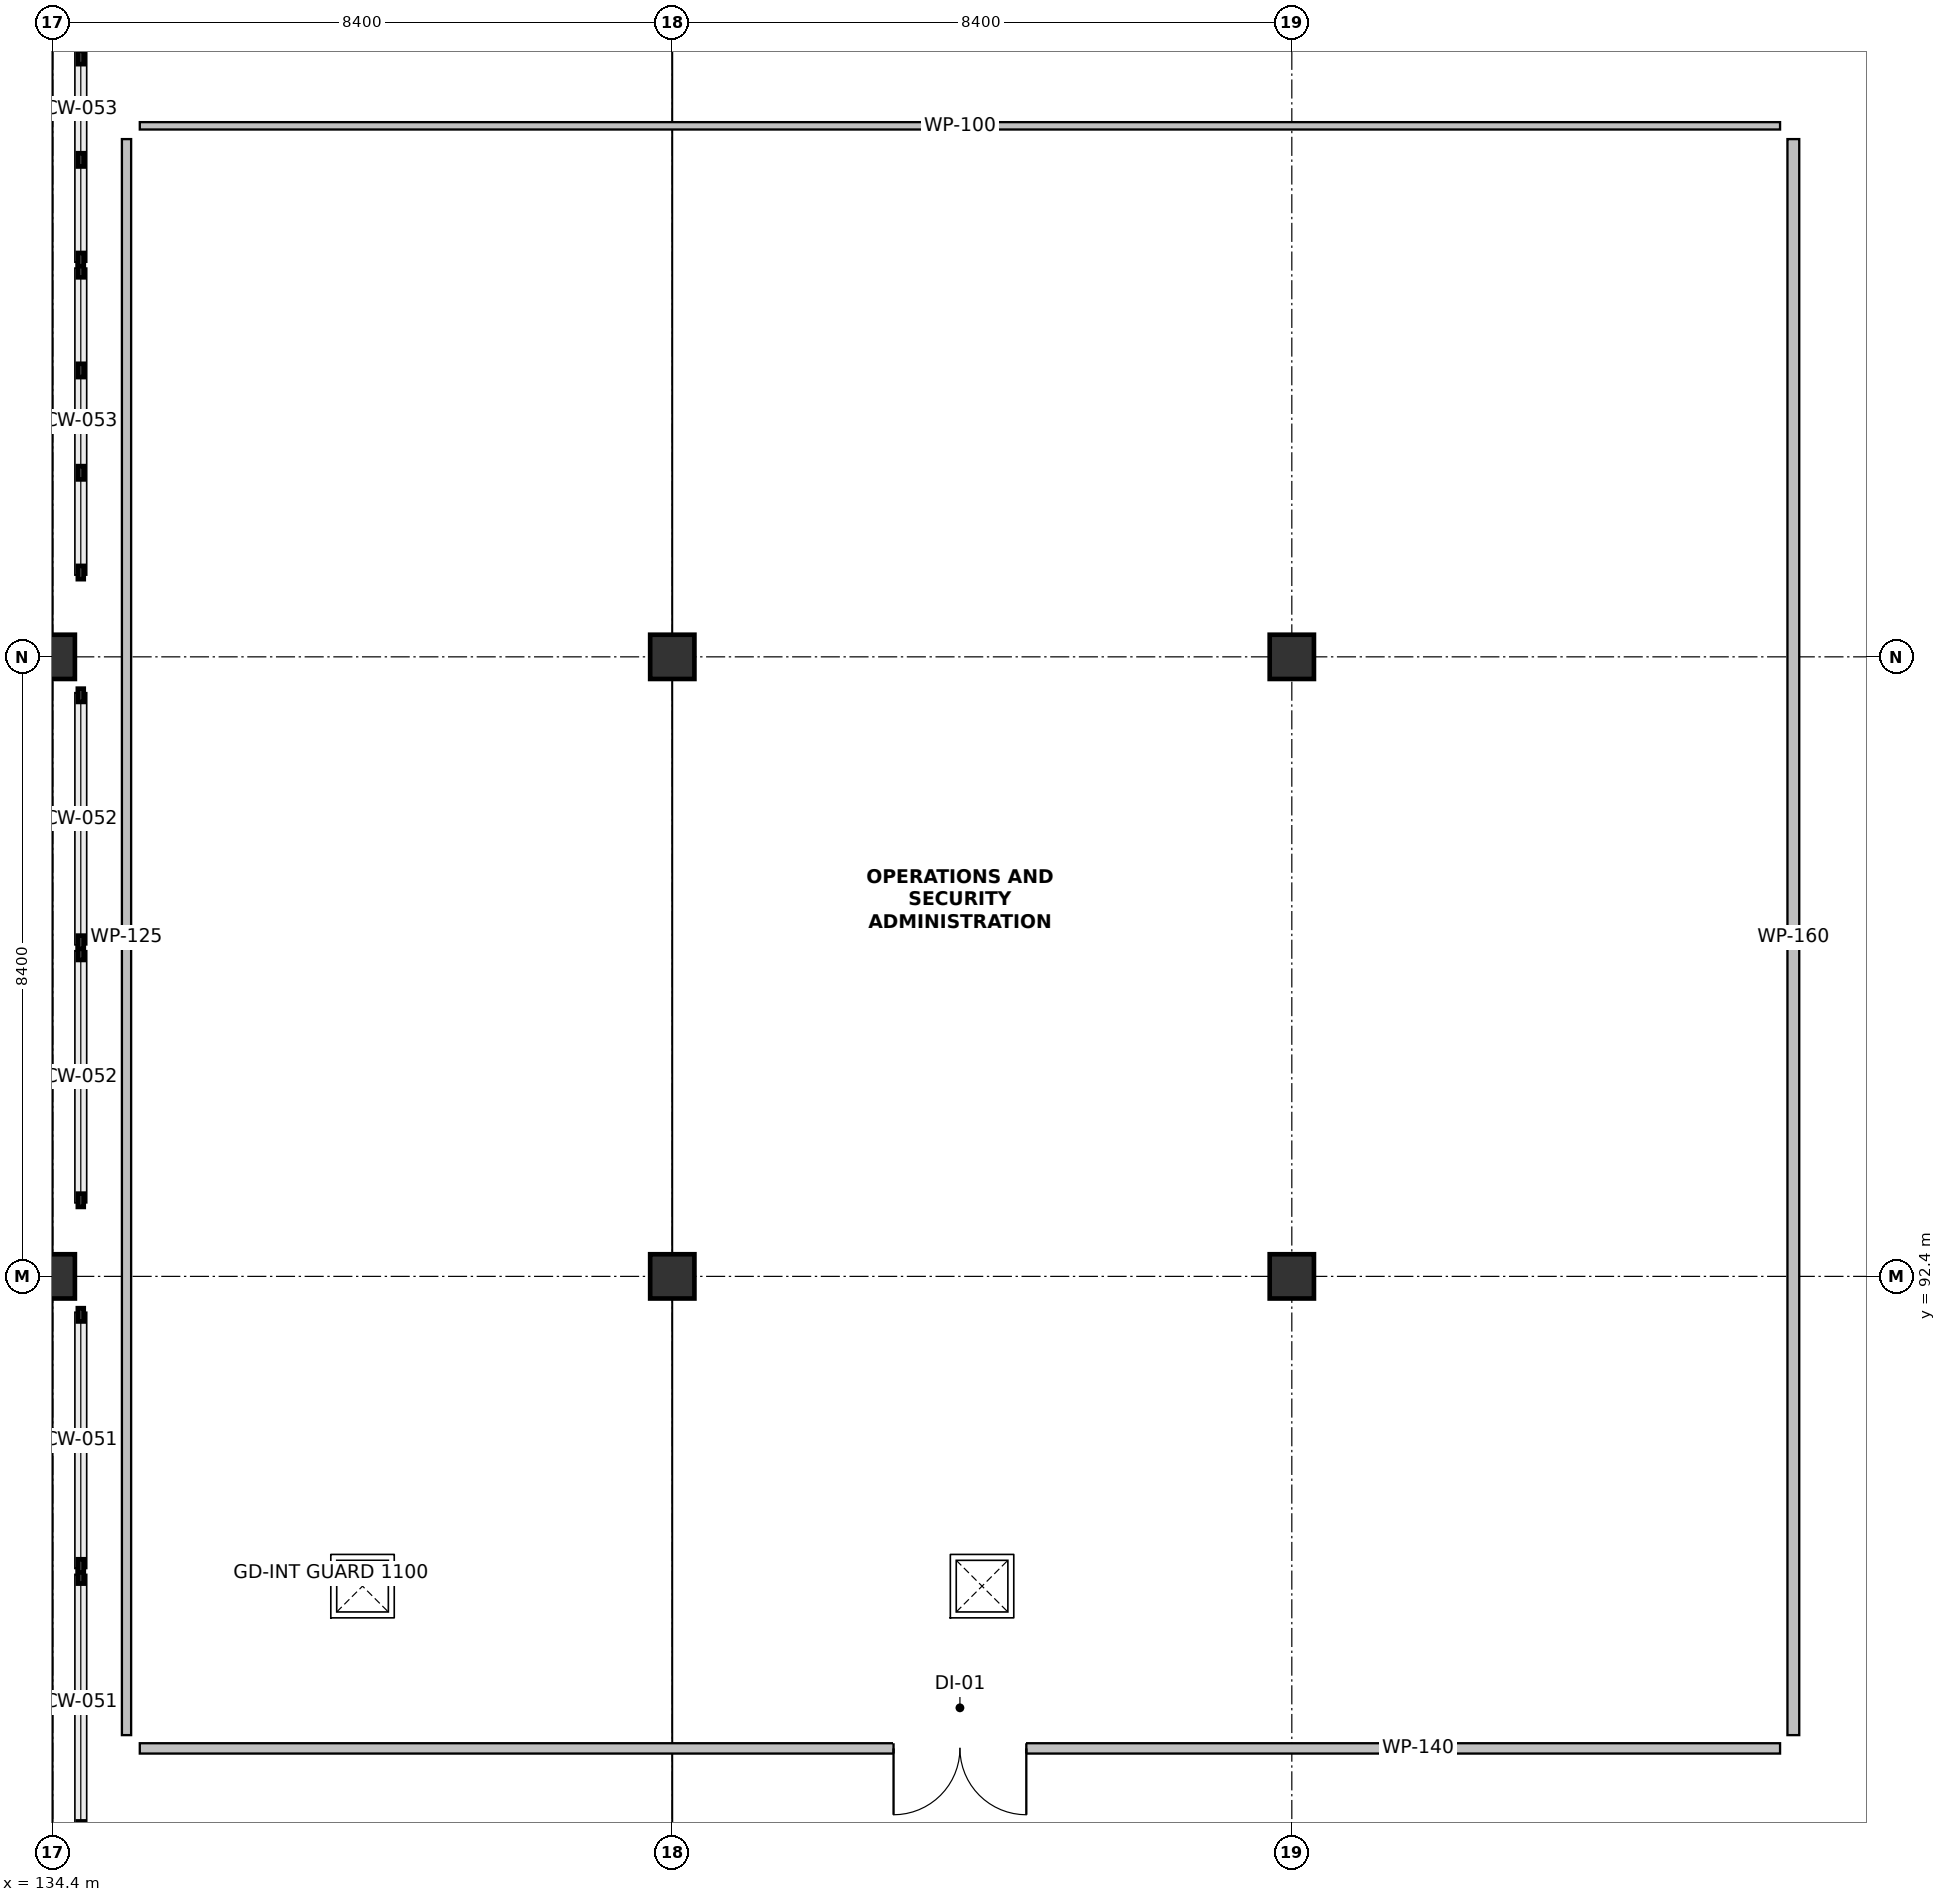
"""IFC4 building model, lengths in metres.
Left out: names, types, materials, properties, quantities, classifications, styles, units other than length and angle.
Written with IfcOpenShell. Run it as: python <this file> out.ifc"""

import sys

from ifc_helpers import new_model, si_unit, direction, frame, frame_2d, origin, origin_2d, place, context, subcontext, project, spatial, rectangle, extrude, element, fill, save


model = new_model("IFC4")
c1 = context("Model", 3, precision=1e-05, world=origin(), true_north=direction((0.0, 1.0)))
c2 = subcontext(c1, "Body", "Model", "MODEL_VIEW")
j1 = project(units=[si_unit("LENGTHUNIT", "METRE"), si_unit("PLANEANGLEUNIT", "RADIAN")], contexts=[c1])
p1 = place(None, origin())
s1 = spatial("IfcSite", under=j1, at=p1, CompositionType="ELEMENT")
p2 = place(p1, origin())
s2 = spatial("IfcBuilding", under=s1, at=p2, CompositionType="ELEMENT")
p3 = place(p2, origin())
s3 = spatial("IfcBuildingStorey", under=s2, at=p3, CompositionType="ELEMENT", Elevation=0.0)
for number, where, z_axis, x_axis in (
    (1, (134.4, 92.4, 0.0), (0.0, 0.0, 1.0), (1.0, 0.0, 0.0)),
    (2, (134.4, 100.8, 0.0), (0.0, 0.0, 1.0), (1.0, 0.0, 0.0)),
    (3, (142.8, 92.4, 0.0), (0.0, 0.0, 1.0), (1.0, 0.0, 0.0)),
    (4, (142.8, 100.8, 0.0), (0.0, 0.0, 1.0), (1.0, 0.0, 0.0)),
    (5, (151.2, 92.4, 0.0), (0.0, 0.0, 1.0), (1.0, 0.0, 0.0)),
    (6, (151.2, 100.8, 0.0), (0.0, 0.0, 1.0), (1.0, 0.0, 0.0)),
):
    element("IfcColumn", number, at=place(p3, frame(where, z_axis=z_axis, x_axis=x_axis)), inside=s3, PredefinedType="COLUMN", context=c2, shape_type="SweptSolid", body=[
        extrude(rectangle(XDim=0.6, YDim=0.6, at=origin_2d()), origin(), (0.0, 0.0, 1.0), 5.1),
    ])
p4 = place(p3, frame((135.58, 108.0, 0.0), z_axis=(0.0, 0.0, 1.0), x_axis=(1.0, 0.0, 0.0)))
e7 = element("IfcWall", 7, at=p4, inside=s3, PredefinedType="PARTITIONING", context=c2, shape_type="SweptSolid", body=[
    extrude(rectangle(XDim=22.24, YDim=0.1, at=frame_2d((11.12, 0.0))), origin(), (0.0, 0.0, 1.0), 4.7),
])
p5 = place(p3, frame((158.0, 107.82, 0.0), z_axis=(0.0, 0.0, 1.0), x_axis=(0.0, -1.0, 0.0)))
e8 = element("IfcWall", 8, at=p5, inside=s3, PredefinedType="PARTITIONING", context=c2, shape_type="SweptSolid", body=[
    extrude(rectangle(XDim=21.64, YDim=0.16, at=frame_2d((10.82, 0.0))), origin(), (0.0, 0.0, 1.0), 4.7),
])
p6 = place(p3, frame((157.82, 86.0, 0.0), z_axis=(0.0, 0.0, 1.0), x_axis=(-1.0, 0.0, 0.0)))
e9 = element("IfcWall", 9, at=p6, inside=s3, PredefinedType="PARTITIONING", context=c2, shape_type="SweptSolid", body=[
    extrude(rectangle(XDim=22.24, YDim=0.14, at=frame_2d((11.12, 0.0))), origin(), (0.0, 0.0, 1.0), 4.7),
])
p7 = place(p6, frame((10.22, 0.0, 0.0)))
e10 = element("IfcOpeningElement", 10, at=p7, cuts=e9, PredefinedType="OPENING", context=c2, shape_type="SweptSolid", body=[
    extrude(rectangle(XDim=1.8, YDim=2.25, at=frame_2d((0.9, 1.125))), frame((0.0, 0.082, 0.0), z_axis=(0.0, -1.0, 0.0), x_axis=(1.0, 0.0, 0.0)), (0.0, 0.0, 1.0), 0.164),
])
p8 = place(p3, frame((135.4, 86.18, 0.0), z_axis=(0.0, 0.0, 1.0), x_axis=(0.0, 1.0, 0.0)))
e11 = element("IfcWall", 11, at=p8, inside=s3, PredefinedType="PARTITIONING", context=c2, shape_type="SweptSolid", body=[
    extrude(rectangle(XDim=21.64, YDim=0.125, at=frame_2d((10.82, 0.0))), origin(), (0.0, 0.0, 1.0), 4.7),
])
p9 = place(p7, origin())
e12 = element("IfcDoor", 12, at=p9, inside=s3, OperationType="DOUBLE_DOOR_SINGLE_SWING", PredefinedType="DOOR", context=c2, shape_type="SweptSolid", body=[
    extrude(rectangle(XDim=1.8, YDim=2.25, at=frame_2d((0.9, 1.125))), frame((0.0, 0.025, 0.0), z_axis=(0.0, -1.0, 0.0), x_axis=(1.0, 0.0, 0.0)), (0.0, 0.0, 1.0), 0.05),
])
fill(e10, e12)
save(model, sys.argv[1])
